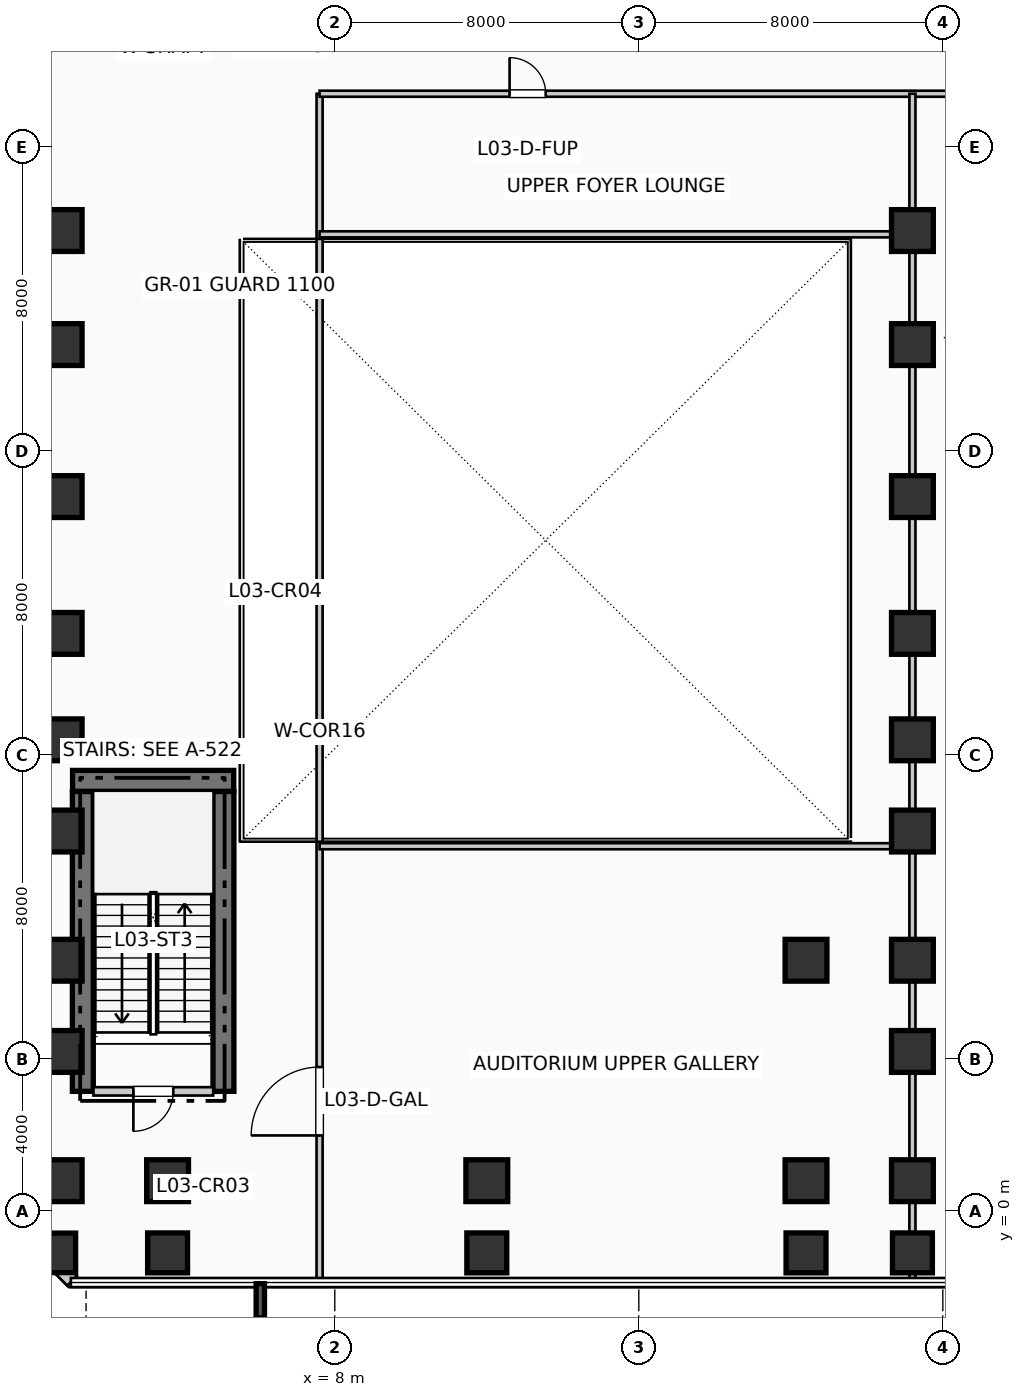
"""IFC4 building model, lengths in metres.
Left out: names, types, materials, properties, quantities, classifications, styles, units other than length and angle.
Written with IfcOpenShell. Run it as: python <this file> out.ifc"""

import sys

from ifc_helpers import new_model, si_unit, direction, frame, frame_2d, origin, origin_2d, place, context, subcontext, project, spatial, rectangle, extrude, element, fill, save


model = new_model("IFC4")
c1 = context("Model", 3, precision=1e-05, world=origin(), true_north=direction((0.0, 1.0)))
c2 = subcontext(c1, "Body", "Model", "MODEL_VIEW")
j1 = project(units=[si_unit("LENGTHUNIT", "METRE"), si_unit("PLANEANGLEUNIT", "RADIAN")], contexts=[c1])
p1 = place(None, origin())
s1 = spatial("IfcSite", under=j1, at=p1, CompositionType="ELEMENT")
p2 = place(p1, origin())
s2 = spatial("IfcBuilding", under=s1, at=p2, CompositionType="ELEMENT")
p3 = place(p2, frame((0.0, 0.0, 16.5)))
s3 = spatial("IfcBuildingStorey", under=s2, at=p3, CompositionType="ELEMENT", Elevation=16.5)
for number, where, z_axis, x_axis in (
    (1, (1.37, 3.15, 0.0), (0.0, 0.0, 1.0), (0.0, 1.0, 0.0)),
    (2, (5.07, 3.15, 0.0), (0.0, 0.0, 1.0), (0.0, 1.0, 0.0)),
):
    element("IfcWall", number, at=place(p3, frame(where, z_axis=z_axis, x_axis=x_axis)), inside=s3, PredefinedType="SHEAR", context=c2, shape_type="SweptSolid", body=[
        extrude(rectangle(XDim=7.89, YDim=0.55, at=frame_2d((3.945, 0.0))), origin(), (0.0, 0.0, 1.0), 4.62),
    ])
p4 = place(p3, frame((1.1, 11.32, 0.0), z_axis=(0.0, 0.0, 1.0), x_axis=(1.0, 0.0, 0.0)))
e3 = element("IfcWall", 3, at=p4, inside=s3, PredefinedType="SHEAR", context=c2, shape_type="SweptSolid", body=[
    extrude(rectangle(XDim=4.24, YDim=0.55, at=frame_2d((2.12, 0.0))), origin(), (0.0, 0.0, 1.0), 4.62),
])
p5 = place(p3, frame((0.8, -1.1, 0.0), z_axis=(0.0, 0.0, 1.0), x_axis=(1.0, 0.0, 0.0)))
e4 = element("IfcColumn", 4, at=p5, inside=s3, PredefinedType="PILASTER", context=c2, shape_type="SweptSolid", body=[
    extrude(rectangle(XDim=0.76, YDim=1.04, at=origin_2d()), origin(), (0.0, 0.0, 1.0), 4.62),
])
for number, where, z_axis, x_axis in (
    (5, (0.8, 0.8, 0.0), (0.0, 0.0, 1.0), (1.0, 0.0, 0.0)),
    (6, (0.8, 4.2, 0.0), (0.0, 0.0, 1.0), (1.0, 0.0, 0.0)),
    (7, (0.8, 6.6, 0.0), (0.0, 0.0, 1.0), (1.0, 0.0, 0.0)),
    (8, (0.8, 10.0, 0.0), (0.0, 0.0, 1.0), (1.0, 0.0, 0.0)),
    (9, (0.8, 12.4, 0.0), (0.0, 0.0, 1.0), (1.0, 0.0, 0.0)),
    (10, (0.8, 15.2, 0.0), (0.0, 0.0, 1.0), (1.0, 0.0, 0.0)),
    (11, (0.8, 18.8, 0.0), (0.0, 0.0, 1.0), (1.0, 0.0, 0.0)),
    (12, (0.8, 22.8, 0.0), (0.0, 0.0, 1.0), (1.0, 0.0, 0.0)),
    (13, (0.8, 25.8, 0.0), (0.0, 0.0, 1.0), (1.0, 0.0, 0.0)),
):
    element("IfcColumn", number, at=place(p3, frame(where, z_axis=z_axis, x_axis=x_axis)), inside=s3, PredefinedType="COLUMN", context=c2, shape_type="SweptSolid", body=[
        extrude(rectangle(XDim=1.1, YDim=1.1, at=origin_2d()), origin(), (0.0, 0.0, 1.0), 4.62),
    ])
p6 = place(p3, frame((3.6, -1.1, 0.0), z_axis=(0.0, 0.0, 1.0), x_axis=(1.0, 0.0, 0.0)))
e14 = element("IfcColumn", 14, at=p6, inside=s3, PredefinedType="COLUMN", context=c2, shape_type="SweptSolid", body=[
    extrude(rectangle(XDim=1.05, YDim=1.05, at=origin_2d()), origin(), (0.0, 0.0, 1.0), 4.62),
])
p7 = place(p3, frame((3.6, 0.8, 0.0), z_axis=(0.0, 0.0, 1.0), x_axis=(1.0, 0.0, 0.0)))
e15 = element("IfcColumn", 15, at=p7, inside=s3, PredefinedType="COLUMN", context=c2, shape_type="SweptSolid", body=[
    extrude(rectangle(XDim=1.1, YDim=1.1, at=origin_2d()), origin(), (0.0, 0.0, 1.0), 4.62),
])
p8 = place(p3, frame((12.0, -1.1, 0.0), z_axis=(0.0, 0.0, 1.0), x_axis=(1.0, 0.0, 0.0)))
e16 = element("IfcColumn", 16, at=p8, inside=s3, PredefinedType="COLUMN", context=c2, shape_type="SweptSolid", body=[
    extrude(rectangle(XDim=1.05, YDim=1.05, at=origin_2d()), origin(), (0.0, 0.0, 1.0), 4.62),
])
p9 = place(p3, frame((12.0, 0.8, 0.0), z_axis=(0.0, 0.0, 1.0), x_axis=(1.0, 0.0, 0.0)))
e17 = element("IfcColumn", 17, at=p9, inside=s3, PredefinedType="COLUMN", context=c2, shape_type="SweptSolid", body=[
    extrude(rectangle(XDim=1.1, YDim=1.1, at=origin_2d()), origin(), (0.0, 0.0, 1.0), 4.62),
])
p10 = place(p3, frame((20.4, -1.1, 0.0), z_axis=(0.0, 0.0, 1.0), x_axis=(1.0, 0.0, 0.0)))
e18 = element("IfcColumn", 18, at=p10, inside=s3, PredefinedType="COLUMN", context=c2, shape_type="SweptSolid", body=[
    extrude(rectangle(XDim=1.05, YDim=1.05, at=origin_2d()), origin(), (0.0, 0.0, 1.0), 4.62),
])
for number, where, z_axis, x_axis in (
    (19, (20.4, 0.8, 0.0), (0.0, 0.0, 1.0), (1.0, 0.0, 0.0)),
    (20, (20.4, 6.6, 0.0), (0.0, 0.0, 1.0), (1.0, 0.0, 0.0)),
):
    element("IfcColumn", number, at=place(p3, frame(where, z_axis=z_axis, x_axis=x_axis)), inside=s3, PredefinedType="COLUMN", context=c2, shape_type="SweptSolid", body=[
        extrude(rectangle(XDim=1.1, YDim=1.1, at=origin_2d()), origin(), (0.0, 0.0, 1.0), 4.62),
    ])
p11 = place(p3, frame((23.2, -1.1, 0.0), z_axis=(0.0, 0.0, 1.0), x_axis=(1.0, 0.0, 0.0)))
e21 = element("IfcColumn", 21, at=p11, inside=s3, PredefinedType="COLUMN", context=c2, shape_type="SweptSolid", body=[
    extrude(rectangle(XDim=1.05, YDim=1.05, at=origin_2d()), origin(), (0.0, 0.0, 1.0), 4.62),
])
for number, where, z_axis, x_axis in (
    (22, (23.2, 0.8, 0.0), (0.0, 0.0, 1.0), (1.0, 0.0, 0.0)),
    (23, (23.2, 4.2, 0.0), (0.0, 0.0, 1.0), (1.0, 0.0, 0.0)),
    (24, (23.2, 6.6, 0.0), (0.0, 0.0, 1.0), (1.0, 0.0, 0.0)),
    (25, (23.2, 10.0, 0.0), (0.0, 0.0, 1.0), (1.0, 0.0, 0.0)),
    (26, (23.2, 12.4, 0.0), (0.0, 0.0, 1.0), (1.0, 0.0, 0.0)),
    (27, (23.2, 15.2, 0.0), (0.0, 0.0, 1.0), (1.0, 0.0, 0.0)),
    (28, (23.2, 18.8, 0.0), (0.0, 0.0, 1.0), (1.0, 0.0, 0.0)),
    (29, (23.2, 22.8, 0.0), (0.0, 0.0, 1.0), (1.0, 0.0, 0.0)),
    (30, (23.2, 25.8, 0.0), (0.0, 0.0, 1.0), (1.0, 0.0, 0.0)),
):
    element("IfcColumn", number, at=place(p3, frame(where, z_axis=z_axis, x_axis=x_axis)), inside=s3, PredefinedType="COLUMN", context=c2, shape_type="SweptSolid", body=[
        extrude(rectangle(XDim=1.1, YDim=1.1, at=origin_2d()), origin(), (0.0, 0.0, 1.0), 4.62),
    ])
p12 = place(p3, frame((-1.834, 1.088, 0.0), z_axis=(0.0, 0.0, 1.0), x_axis=(0.707106781187, -0.707106781187, 0.0)))
e31 = element("IfcWall", 31, at=p12, inside=s3, PredefinedType="SOLIDWALL", context=c2, shape_type="SweptSolid", body=[
    extrude(rectangle(XDim=4.133, YDim=0.36, at=frame_2d((2.066, 0.0))), origin(), (0.0, 0.0, 1.0), 4.3),
])
p13 = place(p3, frame((1.65, 3.15, 0.0), z_axis=(0.0, 0.0, 1.0), x_axis=(1.0, 0.0, 0.0)))
e32 = element("IfcWall", 32, at=p13, inside=s3, PredefinedType="PARTITIONING", context=c2, shape_type="SweptSolid", body=[
    extrude(rectangle(XDim=3.15, YDim=0.22, at=frame_2d((1.575, 0.0))), origin(), (0.0, 0.0, 1.0), 4.3),
])
p14 = place(p13, frame((2.1, 0.0, 0.0), z_axis=(0.0, 0.0, 1.0), x_axis=(-1.0, 0.0, 0.0)))
e33 = element("IfcOpeningElement", 33, at=p14, cuts=e32, PredefinedType="OPENING", context=c2, shape_type="SweptSolid", body=[
    extrude(rectangle(XDim=1.05, YDim=2.15, at=frame_2d((0.525, 1.075))), frame((0.0, 0.12, 0.0), z_axis=(0.0, -1.0, 0.0), x_axis=(1.0, 0.0, 0.0)), (0.0, 0.0, 1.0), 0.24),
])
p15 = place(p3, frame((7.6, -1.81, 0.0), z_axis=(0.0, 0.0, 1.0), x_axis=(0.0, 1.0, 0.0)))
e34 = element("IfcWall", 34, at=p15, inside=s3, PredefinedType="PARTITIONING", context=c2, shape_type="SweptSolid", body=[
    extrude(rectangle(XDim=31.21, YDim=0.16, at=frame_2d((15.605, 0.0))), origin(), (0.0, 0.0, 1.0), 3.385),
])
p16 = place(p15, frame((3.8, 0.0, 0.0)))
e35 = element("IfcOpeningElement", 35, at=p16, cuts=e34, PredefinedType="OPENING", context=c2, shape_type="SweptSolid", body=[
    extrude(rectangle(XDim=1.8, YDim=2.3, at=frame_2d((0.9, 1.15))), frame((0.0, 0.09, 0.0), z_axis=(0.0, -1.0, 0.0), x_axis=(1.0, 0.0, 0.0)), (0.0, 0.0, 1.0), 0.18),
])
p17 = place(p3, frame((7.6, 29.4, 0.0), z_axis=(0.0, 0.0, 1.0), x_axis=(1.0, 0.0, 0.0)))
e36 = element("IfcWall", 36, at=p17, inside=s3, PredefinedType="PARTITIONING", context=c2, shape_type="SweptSolid", body=[
    extrude(rectangle(XDim=43.75, YDim=0.16, at=frame_2d((21.875, 0.0))), origin(), (0.0, 0.0, 1.0), 3.955),
])
p18 = place(p17, frame((5.0, 0.0, 0.0)))
e37 = element("IfcOpeningElement", 37, at=p18, cuts=e36, PredefinedType="OPENING", context=c2, shape_type="SweptSolid", body=[
    extrude(rectangle(XDim=0.95, YDim=2.15, at=frame_2d((0.475, 1.075))), frame((0.0, 0.09, 0.0), z_axis=(0.0, -1.0, 0.0), x_axis=(1.0, 0.0, 0.0)), (0.0, 0.0, 1.0), 0.18),
])
p19 = place(p17, frame((18.0, 0.0, 0.0)))
e38 = element("IfcOpeningElement", 38, at=p19, cuts=e36, PredefinedType="OPENING", context=c2, shape_type="SweptSolid", body=[
    extrude(rectangle(XDim=0.95, YDim=2.15, at=frame_2d((0.475, 1.075))), frame((0.0, 0.09, 0.0), z_axis=(0.0, -1.0, 0.0), x_axis=(1.0, 0.0, 0.0)), (0.0, 0.0, 1.0), 0.18),
])
p20 = place(p17, frame((26.5, 0.0, 0.0)))
e39 = element("IfcOpeningElement", 39, at=p20, cuts=e36, PredefinedType="OPENING", context=c2, shape_type="SweptSolid", body=[
    extrude(rectangle(XDim=0.95, YDim=2.15, at=frame_2d((0.475, 1.075))), frame((0.0, 0.09, 0.0), z_axis=(0.0, -1.0, 0.0), x_axis=(1.0, 0.0, 0.0)), (0.0, 0.0, 1.0), 0.18),
])
p21 = place(p17, frame((35.0, 0.0, 0.0)))
e40 = element("IfcOpeningElement", 40, at=p21, cuts=e36, PredefinedType="OPENING", context=c2, shape_type="SweptSolid", body=[
    extrude(rectangle(XDim=0.95, YDim=2.15, at=frame_2d((0.475, 1.075))), frame((0.0, 0.09, 0.0), z_axis=(0.0, -1.0, 0.0), x_axis=(1.0, 0.0, 0.0)), (0.0, 0.0, 1.0), 0.18),
])
p22 = place(p3, frame((7.6, 25.7, 0.0), z_axis=(0.0, 0.0, 1.0), x_axis=(1.0, 0.0, 0.0)))
e41 = element("IfcWall", 41, at=p22, inside=s3, PredefinedType="PARTITIONING", context=c2, shape_type="SweptSolid", body=[
    extrude(rectangle(XDim=15.6, YDim=0.16, at=frame_2d((7.8, 0.0))), origin(), (0.0, 0.0, 1.0), 3.485),
])
p23 = place(p3, frame((23.2, -1.81, 0.0), z_axis=(0.0, 0.0, 1.0), x_axis=(0.0, 1.0, 0.0)))
e42 = element("IfcWall", 42, at=p23, inside=s3, PredefinedType="PARTITIONING", context=c2, shape_type="SweptSolid", body=[
    extrude(rectangle(XDim=31.21, YDim=0.16, at=frame_2d((15.605, 0.0))), origin(), (0.0, 0.0, 1.0), 3.485),
])
p24 = place(p3, frame((7.6, 9.6, 0.0), z_axis=(0.0, 0.0, 1.0), x_axis=(1.0, 0.0, 0.0)))
e43 = element("IfcWall", 43, at=p24, inside=s3, PredefinedType="PARTITIONING", context=c2, shape_type="SweptSolid", body=[
    extrude(rectangle(XDim=15.6, YDim=0.16, at=frame_2d((7.8, 0.0))), origin(), (0.0, 0.0, 1.0), 4.3),
])
p25 = place(p14, origin())
e44 = element("IfcDoor", 44, at=p25, inside=s3, OperationType="SINGLE_SWING_LEFT", PredefinedType="DOOR", context=c2, shape_type="SweptSolid", body=[
    extrude(rectangle(XDim=1.05, YDim=2.15, at=frame_2d((0.525, 1.075))), frame((0.0, 0.025, 0.0), z_axis=(0.0, -1.0, 0.0), x_axis=(1.0, 0.0, 0.0)), (0.0, 0.0, 1.0), 0.05),
])
fill(e33, e44)
p26 = place(p18, origin())
e45 = element("IfcDoor", 45, at=p26, inside=s3, OperationType="SINGLE_SWING_LEFT", PredefinedType="DOOR", context=c2, shape_type="SweptSolid", body=[
    extrude(rectangle(XDim=0.95, YDim=2.15, at=frame_2d((0.475, 1.075))), frame((0.0, 0.025, 0.0), z_axis=(0.0, -1.0, 0.0), x_axis=(1.0, 0.0, 0.0)), (0.0, 0.0, 1.0), 0.05),
])
fill(e37, e45)
p27 = place(p16, origin())
e46 = element("IfcDoor", 46, at=p27, inside=s3, OperationType="SINGLE_SWING_LEFT", PredefinedType="DOOR", context=c2, shape_type="SweptSolid", body=[
    extrude(rectangle(XDim=1.8, YDim=2.3, at=frame_2d((0.9, 1.15))), frame((0.0, 0.025, 0.0), z_axis=(0.0, -1.0, 0.0), x_axis=(1.0, 0.0, 0.0)), (0.0, 0.0, 1.0), 0.05),
])
fill(e35, e46)
save(model, sys.argv[1])
